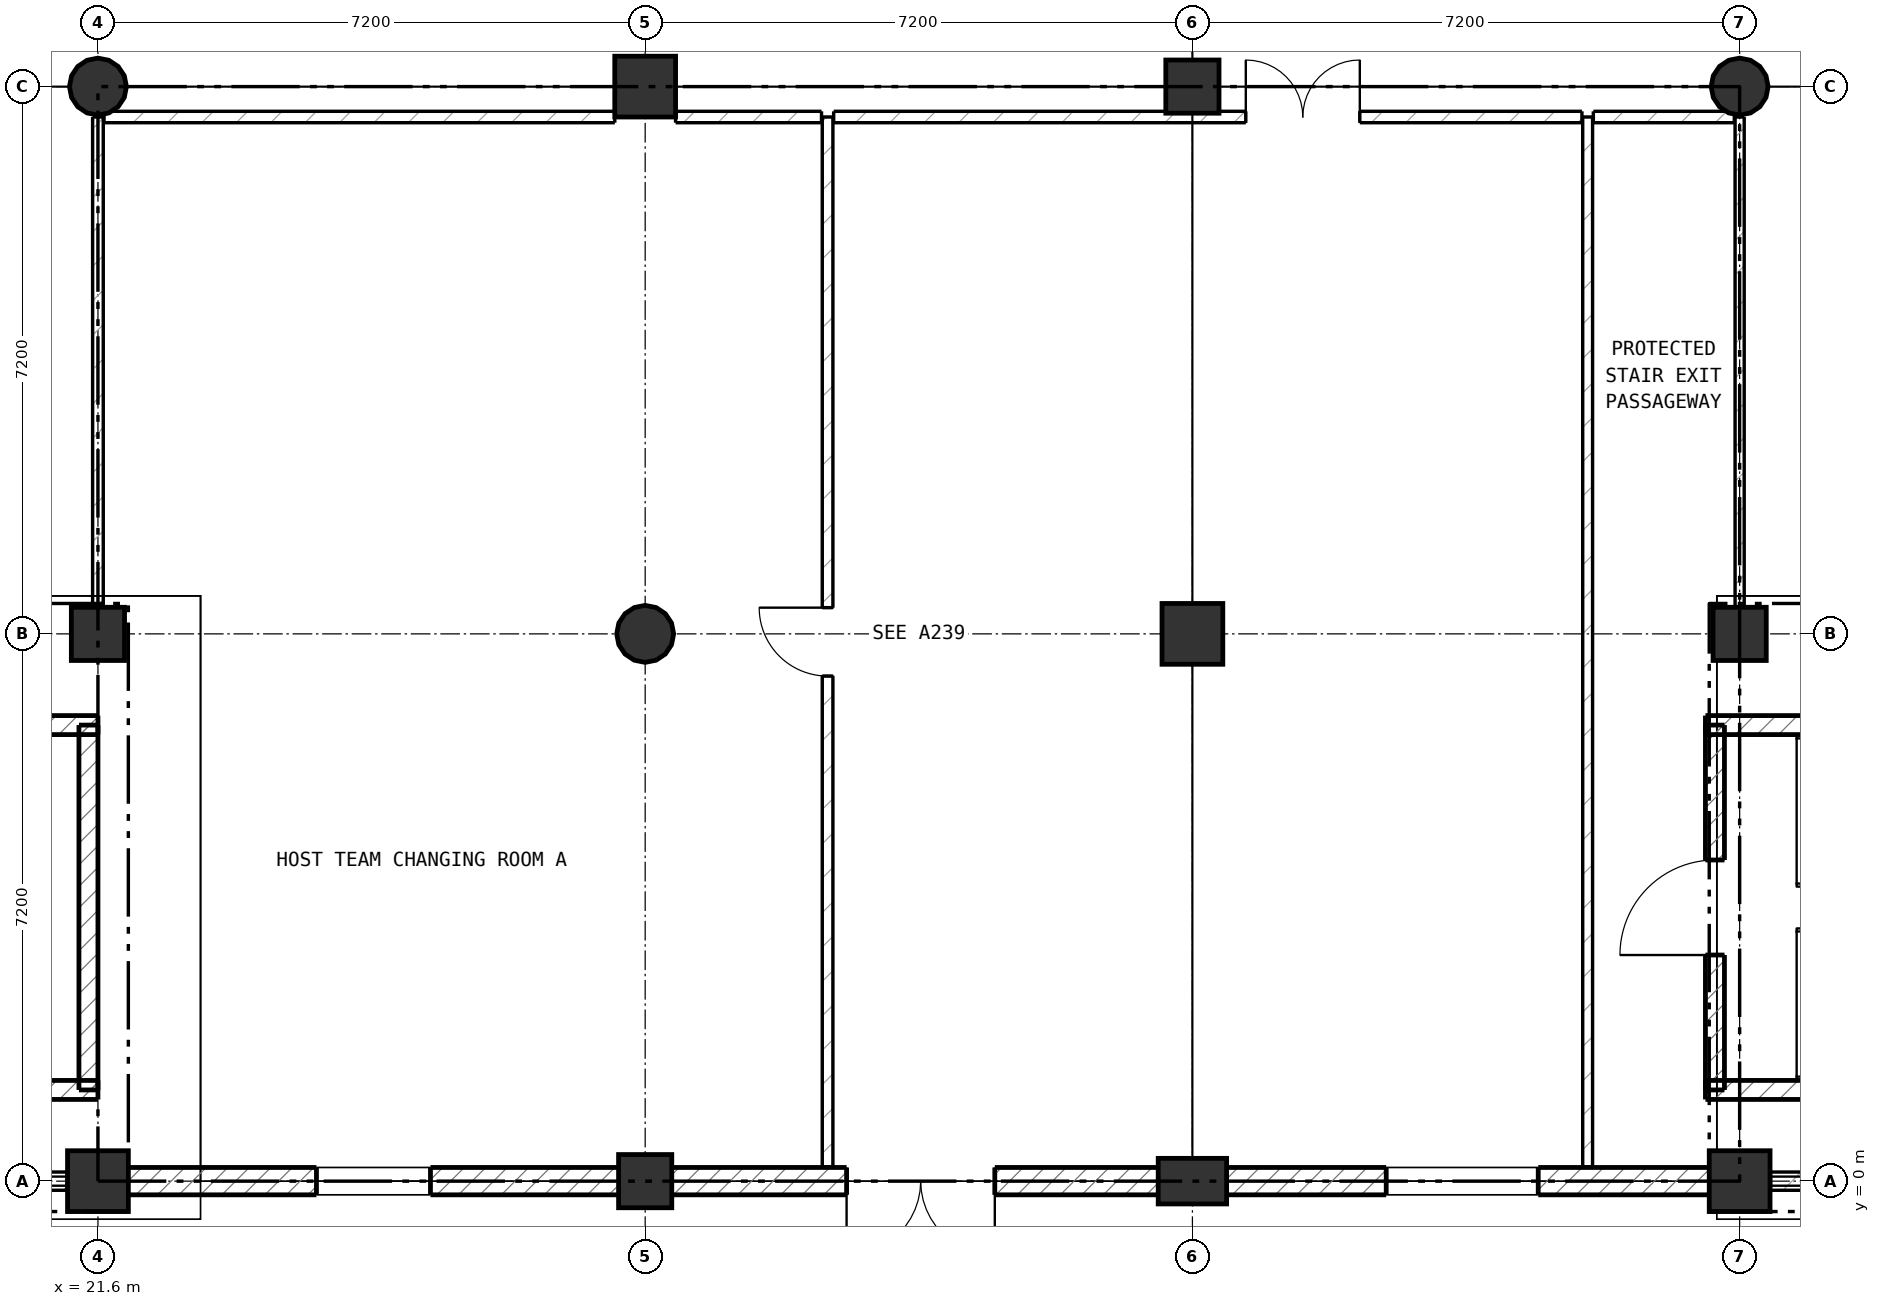
"""IFC4 building model, lengths in metres.
Left out: names, types, materials, properties, quantities, classifications, styles, units other than length and angle.
Written with IfcOpenShell. Run it as: python <this file> out.ifc"""

import sys

from ifc_helpers import new_model, si_unit, direction, frame, frame_2d, origin, origin_2d, place, context, subcontext, project, spatial, rectangle, circle, extrude, element, fill, save


model = new_model("IFC4")
c1 = context("Model", 3, precision=1e-05, world=origin(), true_north=direction((0.0, 1.0)))
c2 = subcontext(c1, "Body", "Model", "MODEL_VIEW")
j1 = project(units=[si_unit("LENGTHUNIT", "METRE"), si_unit("PLANEANGLEUNIT", "RADIAN")], contexts=[c1])
p1 = place(None, origin())
s1 = spatial("IfcSite", under=j1, at=p1, CompositionType="ELEMENT")
p2 = place(p1, origin())
s2 = spatial("IfcBuilding", under=s1, at=p2, CompositionType="ELEMENT")
p3 = place(p2, origin())
s3 = spatial("IfcBuildingStorey", under=s2, at=p3, CompositionType="ELEMENT", Elevation=0.0)
p4 = place(p3, frame((21.6, 0.0, 0.0), z_axis=(0.0, 0.0, 1.0), x_axis=(1.0, 0.0, 0.0)))
e1 = element("IfcColumn", 1, at=p4, inside=s3, PredefinedType="COLUMN", context=c2, shape_type="SweptSolid", body=[
    extrude(rectangle(XDim=0.8, YDim=0.8, at=origin_2d()), origin(), (0.0, 0.0, 1.0), 5.6),
])
p5 = place(p3, frame((21.6, 7.2, 0.0), z_axis=(0.0, 0.0, 1.0), x_axis=(1.0, 0.0, 0.0)))
e2 = element("IfcColumn", 2, at=p5, inside=s3, PredefinedType="COLUMN", context=c2, shape_type="SweptSolid", body=[
    extrude(rectangle(XDim=0.7, YDim=0.7, at=origin_2d()), origin(), (0.0, 0.0, 1.0), 5.6),
])
p6 = place(p3, frame((21.6, 14.4, 0.0), z_axis=(0.0, 0.0, 1.0), x_axis=(1.0, 0.0, 0.0)))
e3 = element("IfcColumn", 3, at=p6, inside=s3, PredefinedType="COLUMN", context=c2, shape_type="SweptSolid", body=[
    extrude(circle(Radius=0.375, at=origin_2d()), origin(), (0.0, 0.0, 1.0), 5.6),
])
p7 = place(p3, frame((28.8, 0.0, 0.0), z_axis=(0.0, 0.0, 1.0), x_axis=(1.0, 0.0, 0.0)))
e4 = element("IfcColumn", 4, at=p7, inside=s3, PredefinedType="COLUMN", context=c2, shape_type="SweptSolid", body=[
    extrude(rectangle(XDim=0.7, YDim=0.7, at=origin_2d()), origin(), (0.0, 0.0, 1.0), 5.6),
])
p8 = place(p3, frame((28.8, 7.2, 0.0), z_axis=(0.0, 0.0, 1.0), x_axis=(1.0, 0.0, 0.0)))
e5 = element("IfcColumn", 5, at=p8, inside=s3, PredefinedType="COLUMN", context=c2, shape_type="SweptSolid", body=[
    extrude(circle(Radius=0.375, at=origin_2d()), origin(), (0.0, 0.0, 1.0), 5.6),
])
p9 = place(p3, frame((28.8, 14.4, 0.0), z_axis=(0.0, 0.0, 1.0), x_axis=(1.0, 0.0, 0.0)))
e6 = element("IfcColumn", 6, at=p9, inside=s3, PredefinedType="COLUMN", context=c2, shape_type="SweptSolid", body=[
    extrude(rectangle(XDim=0.8, YDim=0.8, at=origin_2d()), origin(), (0.0, 0.0, 1.0), 5.6),
])
p10 = place(p3, frame((36.0, 0.0, 0.0), z_axis=(0.0, 0.0, 1.0), x_axis=(1.0, 0.0, 0.0)))
e7 = element("IfcColumn", 7, at=p10, inside=s3, PredefinedType="COLUMN", context=c2, shape_type="SweptSolid", body=[
    extrude(rectangle(XDim=0.6, YDim=0.9, at=origin_2d()), origin(), (0.0, 0.0, 1.0), 5.6),
])
p11 = place(p3, frame((36.0, 7.2, 0.0), z_axis=(0.0, 0.0, 1.0), x_axis=(1.0, 0.0, 0.0)))
e8 = element("IfcColumn", 8, at=p11, inside=s3, PredefinedType="COLUMN", context=c2, shape_type="SweptSolid", body=[
    extrude(rectangle(XDim=0.8, YDim=0.8, at=origin_2d()), origin(), (0.0, 0.0, 1.0), 5.6),
])
p12 = place(p3, frame((36.0, 14.4, 0.0), z_axis=(0.0, 0.0, 1.0), x_axis=(1.0, 0.0, 0.0)))
e9 = element("IfcColumn", 9, at=p12, inside=s3, PredefinedType="COLUMN", context=c2, shape_type="SweptSolid", body=[
    extrude(rectangle(XDim=0.7, YDim=0.7, at=origin_2d()), origin(), (0.0, 0.0, 1.0), 5.6),
])
p13 = place(p3, frame((43.2, 0.0, 0.0), z_axis=(0.0, 0.0, 1.0), x_axis=(1.0, 0.0, 0.0)))
e10 = element("IfcColumn", 10, at=p13, inside=s3, PredefinedType="COLUMN", context=c2, shape_type="SweptSolid", body=[
    extrude(rectangle(XDim=0.8, YDim=0.8, at=origin_2d()), origin(), (0.0, 0.0, 1.0), 5.6),
])
p14 = place(p3, frame((43.2, 7.2, 0.0), z_axis=(0.0, 0.0, 1.0), x_axis=(1.0, 0.0, 0.0)))
e11 = element("IfcColumn", 11, at=p14, inside=s3, PredefinedType="COLUMN", context=c2, shape_type="SweptSolid", body=[
    extrude(rectangle(XDim=0.7, YDim=0.7, at=origin_2d()), origin(), (0.0, 0.0, 1.0), 5.6),
])
p15 = place(p3, frame((43.2, 14.4, 0.0), z_axis=(0.0, 0.0, 1.0), x_axis=(1.0, 0.0, 0.0)))
e12 = element("IfcColumn", 12, at=p15, inside=s3, PredefinedType="COLUMN", context=c2, shape_type="SweptSolid", body=[
    extrude(circle(Radius=0.375, at=origin_2d()), origin(), (0.0, 0.0, 1.0), 5.6),
])
p16 = place(p3, frame((45.64, 0.0, 0.0), z_axis=(0.0, 0.0, 1.0), x_axis=(-1.0, 0.0, 0.0)))
e13 = element("IfcWall", 13, at=p16, inside=s3, PredefinedType="SOLIDWALL", context=c2, shape_type="SweptSolid", body=[
    extrude(rectangle(XDim=2.055, YDim=0.24, at=frame_2d((1.027, 0.0))), origin(), (0.0, 0.0, 1.0), 0.35),
])
p17 = place(p3, frame((42.815, 0.0, 0.0), z_axis=(0.0, 0.0, 1.0), x_axis=(-1.0, 0.0, 0.0)))
e14 = element("IfcWall", 14, at=p17, inside=s3, PredefinedType="SOLIDWALL", context=c2, shape_type="SweptSolid", body=[
    extrude(rectangle(XDim=6.53, YDim=0.36, at=frame_2d((3.265, 0.0))), origin(), (0.0, 0.0, 1.0), 5.6),
])
p18 = place(p17, frame((2.265, 0.0, 2.1)))
e15 = element("IfcOpeningElement", 15, at=p18, cuts=e14, PredefinedType="OPENING", context=c2, shape_type="SweptSolid", body=[
    extrude(rectangle(XDim=2.0, YDim=0.9, at=frame_2d((1.0, 0.45))), frame((0.0, 0.19, 0.0), z_axis=(0.0, -1.0, 0.0), x_axis=(1.0, 0.0, 0.0)), (0.0, 0.0, 1.0), 0.38),
])
p19 = place(p3, frame((35.715, 0.0, 0.0), z_axis=(0.0, 0.0, 1.0), x_axis=(-1.0, 0.0, 0.0)))
e16 = element("IfcWall", 16, at=p19, inside=s3, PredefinedType="SOLIDWALL", context=c2, shape_type="SweptSolid", body=[
    extrude(rectangle(XDim=6.58, YDim=0.36, at=frame_2d((3.29, 0.0))), origin(), (0.0, 0.0, 1.0), 5.6),
])
p20 = place(p19, frame((2.315, 0.0, 0.0)))
e17 = element("IfcOpeningElement", 17, at=p20, cuts=e16, PredefinedType="OPENING", context=c2, shape_type="SweptSolid", body=[
    extrude(rectangle(XDim=1.95, YDim=2.2, at=frame_2d((0.975, 1.1))), frame((0.0, 0.19, 0.0), z_axis=(0.0, -1.0, 0.0), x_axis=(1.0, 0.0, 0.0)), (0.0, 0.0, 1.0), 0.38),
])
p21 = place(p3, frame((28.465, 0.0, 0.0), z_axis=(0.0, 0.0, 1.0), x_axis=(-1.0, 0.0, 0.0)))
e18 = element("IfcWall", 18, at=p21, inside=s3, PredefinedType="SOLIDWALL", context=c2, shape_type="SweptSolid", body=[
    extrude(rectangle(XDim=6.48, YDim=0.36, at=frame_2d((3.24, 0.0))), origin(), (0.0, 0.0, 1.0), 5.6),
])
p22 = place(p21, frame((2.49, 0.0, 0.9)))
e19 = element("IfcOpeningElement", 19, at=p22, cuts=e18, PredefinedType="OPENING", context=c2, shape_type="SweptSolid", body=[
    extrude(rectangle(XDim=1.5, YDim=2.7, at=frame_2d((0.75, 1.35))), frame((0.0, 0.19, 0.0), z_axis=(0.0, -1.0, 0.0), x_axis=(1.0, 0.0, 0.0)), (0.0, 0.0, 1.0), 0.38),
])
p23 = place(p3, frame((21.215, 0.0, 0.0), z_axis=(0.0, 0.0, 1.0), x_axis=(-1.0, 0.0, 0.0)))
e20 = element("IfcWall", 20, at=p23, inside=s3, PredefinedType="SOLIDWALL", context=c2, shape_type="SweptSolid", body=[
    extrude(rectangle(XDim=3.955, YDim=0.24, at=frame_2d((1.978, 0.0))), origin(), (0.0, 0.0, 1.0), 0.35),
])
p24 = place(p3, frame((13.95, 6.0, 0.0), z_axis=(0.0, 0.0, 1.0), x_axis=(1.0, 0.0, 0.0)))
e21 = element("IfcWall", 21, at=p24, inside=s3, PredefinedType="SHEAR", context=c2, shape_type="SweptSolid", body=[
    extrude(rectangle(XDim=7.65, YDim=0.25, at=frame_2d((3.825, 0.0))), origin(), (0.0, 0.0, 1.0), 5.6),
])
p25 = place(p3, frame((21.475, 6.0, 0.0), z_axis=(0.0, 0.0, 1.0), x_axis=(0.0, -1.0, 0.0)))
e22 = element("IfcWall", 22, at=p25, inside=s3, PredefinedType="SHEAR", context=c2, shape_type="SweptSolid", body=[
    extrude(rectangle(XDim=4.8, YDim=0.25, at=frame_2d((2.4, 0.0))), origin(), (0.0, 0.0, 1.0), 5.6),
])
p26 = place(p3, frame((21.6, 1.2, 0.0), z_axis=(0.0, 0.0, 1.0), x_axis=(-1.0, 0.0, 0.0)))
e23 = element("IfcWall", 23, at=p26, inside=s3, PredefinedType="SHEAR", context=c2, shape_type="SweptSolid", body=[
    extrude(rectangle(XDim=7.65, YDim=0.25, at=frame_2d((3.825, 0.0))), origin(), (0.0, 0.0, 1.0), 5.6),
])
p27 = place(p3, frame((42.875, 1.2, 0.0), z_axis=(0.0, 0.0, 1.0), x_axis=(0.0, 1.0, 0.0)))
e24 = element("IfcWall", 24, at=p27, inside=s3, PredefinedType="SHEAR", context=c2, shape_type="SweptSolid", body=[
    extrude(rectangle(XDim=4.8, YDim=0.25, at=frame_2d((2.4, 0.0))), origin(), (0.0, 0.0, 1.0), 5.6),
])
p28 = place(p27, frame((1.775, 0.0, 0.0)))
e25 = element("IfcOpeningElement", 25, at=p28, cuts=e24, PredefinedType="OPENING", context=c2, shape_type="SweptSolid", body=[
    extrude(rectangle(XDim=1.25, YDim=2.2, at=frame_2d((0.625, 1.1))), frame((0.0, 0.135, 0.0), z_axis=(0.0, -1.0, 0.0), x_axis=(1.0, 0.0, 0.0)), (0.0, 0.0, 1.0), 0.27),
])
for number, where, z_axis, x_axis in (
    (26, (42.75, 6.0, 0.0), (0.0, 0.0, 1.0), (1.0, 0.0, 0.0)),
    (27, (50.4, 1.2, 0.0), (0.0, 0.0, 1.0), (-1.0, 0.0, 0.0)),
):
    element("IfcWall", number, at=place(p3, frame(where, z_axis=z_axis, x_axis=x_axis)), inside=s3, PredefinedType="SHEAR", context=c2, shape_type="SweptSolid", body=[
        extrude(rectangle(XDim=7.65, YDim=0.25, at=frame_2d((3.825, 0.0))), origin(), (0.0, 0.0, 1.0), 5.6),
    ])
p29 = place(p3, frame((21.6, 7.55, 0.0), z_axis=(0.0, 0.0, 1.0), x_axis=(0.0, 1.0, 0.0)))
e28 = element("IfcWall", 28, at=p29, inside=s3, PredefinedType="PARTITIONING", context=c2, shape_type="SweptSolid", body=[
    extrude(rectangle(XDim=6.45, YDim=0.14, at=frame_2d((3.225, 0.0))), origin(), (0.0, 0.0, 1.0), 5.3),
])
p30 = place(p3, frame((41.2, 0.19, 0.0), z_axis=(0.0, 0.0, 1.0), x_axis=(0.0, 1.0, 0.0)))
e29 = element("IfcWall", 29, at=p30, inside=s3, PredefinedType="PARTITIONING", context=c2, shape_type="SweptSolid", body=[
    extrude(rectangle(XDim=13.81, YDim=0.13, at=frame_2d((6.905, 0.0))), origin(), (0.0, 0.0, 1.0), 5.3),
])
p31 = place(p3, frame((43.2, 7.55, 0.0), z_axis=(0.0, 0.0, 1.0), x_axis=(0.0, 1.0, 0.0)))
e30 = element("IfcWall", 30, at=p31, inside=s3, PredefinedType="PARTITIONING", context=c2, shape_type="SweptSolid", body=[
    extrude(rectangle(XDim=6.45, YDim=0.12, at=frame_2d((3.225, 0.0))), origin(), (0.0, 0.0, 1.0), 4.88),
])
p32 = place(p3, frame((31.2, 0.19, 0.0), z_axis=(0.0, 0.0, 1.0), x_axis=(0.0, 1.0, 0.0)))
e31 = element("IfcWall", 31, at=p32, inside=s3, PredefinedType="PARTITIONING", context=c2, shape_type="SweptSolid", body=[
    extrude(rectangle(XDim=13.81, YDim=0.14, at=frame_2d((6.905, 0.0))), origin(), (0.0, 0.0, 1.0), 5.3),
])
p33 = place(p32, frame((6.455, 0.0, 0.0)))
e32 = element("IfcOpeningElement", 32, at=p33, cuts=e31, PredefinedType="OPENING", context=c2, shape_type="SweptSolid", body=[
    extrude(rectangle(XDim=0.9, YDim=2.1, at=frame_2d((0.45, 1.05))), frame((0.0, 0.08, 0.0), z_axis=(0.0, -1.0, 0.0), x_axis=(1.0, 0.0, 0.0)), (0.0, 0.0, 1.0), 0.16),
])
p34 = place(p3, frame((21.68, 14.0, 0.0), z_axis=(0.0, 0.0, 1.0), x_axis=(1.0, 0.0, 0.0)))
e33 = element("IfcWall", 33, at=p34, inside=s3, PredefinedType="PARTITIONING", context=c2, shape_type="SweptSolid", body=[
    extrude(rectangle(XDim=6.72, YDim=0.15, at=frame_2d((3.36, 0.0))), origin(), (0.0, 0.0, 1.0), 5.3),
])
p35 = place(p3, frame((29.2, 14.0, 0.0), z_axis=(0.0, 0.0, 1.0), x_axis=(1.0, 0.0, 0.0)))
e34 = element("IfcWall", 34, at=p35, inside=s3, PredefinedType="PARTITIONING", context=c2, shape_type="SweptSolid", body=[
    extrude(rectangle(XDim=1.92, YDim=0.15, at=frame_2d((0.96, 0.0))), origin(), (0.0, 0.0, 1.0), 5.3),
])
p36 = place(p3, frame((31.28, 14.0, 0.0), z_axis=(0.0, 0.0, 1.0), x_axis=(1.0, 0.0, 0.0)))
e35 = element("IfcWall", 35, at=p36, inside=s3, PredefinedType="PARTITIONING", context=c2, shape_type="SweptSolid", body=[
    extrude(rectangle(XDim=9.845, YDim=0.15, at=frame_2d((4.922, 0.0))), origin(), (0.0, 0.0, 1.0), 5.3),
])
p37 = place(p36, frame((5.423, 0.0, 0.0)))
e36 = element("IfcOpeningElement", 36, at=p37, cuts=e35, PredefinedType="OPENING", context=c2, shape_type="SweptSolid", body=[
    extrude(rectangle(XDim=1.5, YDim=2.2, at=frame_2d((0.75, 1.1))), frame((0.0, 0.085, 0.0), z_axis=(0.0, -1.0, 0.0), x_axis=(1.0, 0.0, 0.0)), (0.0, 0.0, 1.0), 0.17),
])
p38 = place(p3, frame((41.275, 14.0, 0.0), z_axis=(0.0, 0.0, 1.0), x_axis=(1.0, 0.0, 0.0)))
e37 = element("IfcWall", 37, at=p38, inside=s3, PredefinedType="PARTITIONING", context=c2, shape_type="SweptSolid", body=[
    extrude(rectangle(XDim=1.855, YDim=0.15, at=frame_2d((0.927, 0.0))), origin(), (0.0, 0.0, 1.0), 5.3),
])
p39 = place(p18, origin())
e38 = element("IfcWindow", 38, at=p39, inside=s3, PartitioningType="SINGLE_PANEL", PredefinedType="WINDOW", context=c2, shape_type="SweptSolid", body=[
    extrude(rectangle(XDim=2.0, YDim=0.9, at=frame_2d((1.0, 0.45))), frame((0.0, 0.03, 0.0), z_axis=(0.0, -1.0, 0.0), x_axis=(1.0, 0.0, 0.0)), (0.0, 0.0, 1.0), 0.06),
])
fill(e15, e38)
p40 = place(p20, origin())
e39 = element("IfcDoor", 39, at=p40, inside=s3, OperationType="DOUBLE_DOOR_SINGLE_SWING", PredefinedType="DOOR", context=c2, shape_type="SweptSolid", body=[
    extrude(rectangle(XDim=1.95, YDim=2.2, at=frame_2d((0.975, 1.1))), frame((0.0, 0.025, 0.0), z_axis=(0.0, -1.0, 0.0), x_axis=(1.0, 0.0, 0.0)), (0.0, 0.0, 1.0), 0.05),
])
fill(e17, e39)
p41 = place(p22, origin())
e40 = element("IfcWindow", 40, at=p41, inside=s3, PartitioningType="SINGLE_PANEL", PredefinedType="WINDOW", context=c2, shape_type="SweptSolid", body=[
    extrude(rectangle(XDim=1.5, YDim=2.7, at=frame_2d((0.75, 1.35))), frame((0.0, 0.03, 0.0), z_axis=(0.0, -1.0, 0.0), x_axis=(1.0, 0.0, 0.0)), (0.0, 0.0, 1.0), 0.06),
])
fill(e19, e40)
p42 = place(p28, origin())
e41 = element("IfcDoor", 41, at=p42, inside=s3, OperationType="SINGLE_SWING_LEFT", PredefinedType="DOOR", context=c2, shape_type="SweptSolid", body=[
    extrude(rectangle(XDim=1.25, YDim=2.2, at=frame_2d((0.625, 1.1))), frame((0.0, 0.025, 0.0), z_axis=(0.0, -1.0, 0.0), x_axis=(1.0, 0.0, 0.0)), (0.0, 0.0, 1.0), 0.05),
])
fill(e25, e41)
p43 = place(p33, origin())
e42 = element("IfcDoor", 42, at=p43, inside=s3, OperationType="SINGLE_SWING_RIGHT", PredefinedType="DOOR", context=c2, shape_type="SweptSolid", body=[
    extrude(rectangle(XDim=0.9, YDim=2.1, at=frame_2d((0.45, 1.05))), frame((0.0, 0.025, 0.0), z_axis=(0.0, -1.0, 0.0), x_axis=(1.0, 0.0, 0.0)), (0.0, 0.0, 1.0), 0.05),
])
fill(e32, e42)
p44 = place(p37, origin())
e43 = element("IfcDoor", 43, at=p44, inside=s3, OperationType="DOUBLE_DOOR_SINGLE_SWING", PredefinedType="DOOR", context=c2, shape_type="SweptSolid", body=[
    extrude(rectangle(XDim=1.5, YDim=2.2, at=frame_2d((0.75, 1.1))), frame((0.0, 0.025, 0.0), z_axis=(0.0, -1.0, 0.0), x_axis=(1.0, 0.0, 0.0)), (0.0, 0.0, 1.0), 0.05),
])
fill(e36, e43)
save(model, sys.argv[1])
